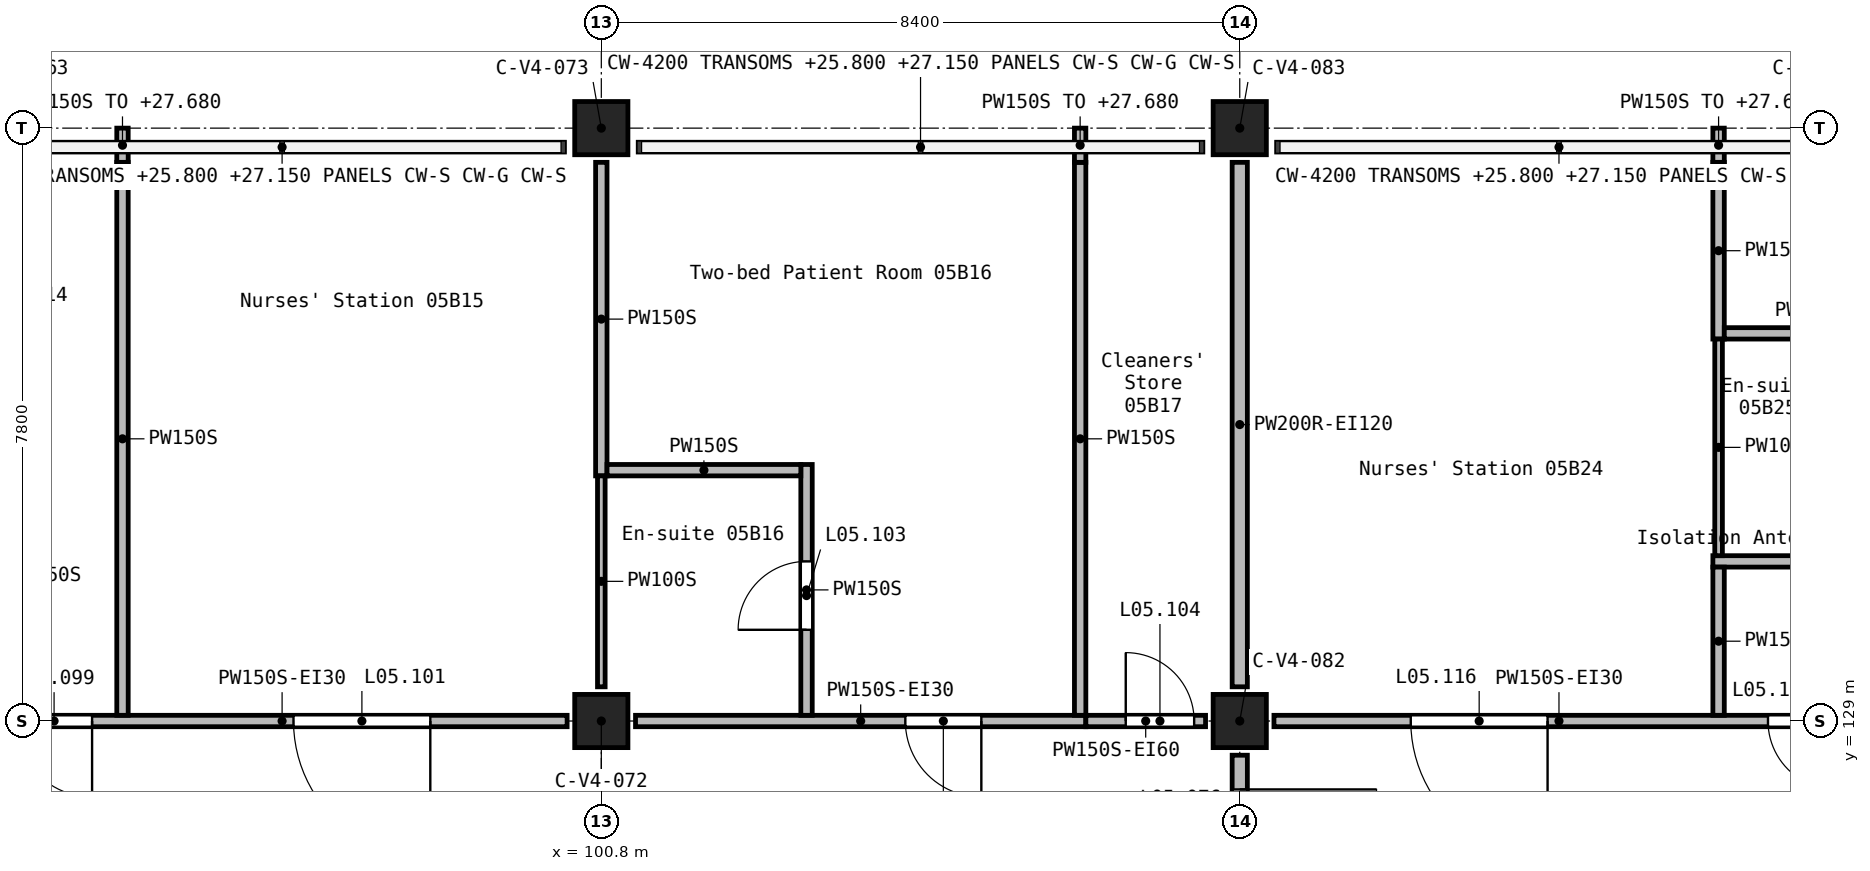
"""IFC4 building model, lengths in metres.
Left out: names, types, materials, properties, quantities, classifications, styles, units other than length and angle.
Written with IfcOpenShell. Run it as: python <this file> out.ifc"""

import sys

from ifc_helpers import new_model, si_unit, direction, frame, frame_2d, origin, origin_2d, place, context, subcontext, project, spatial, rectangle, extrude, element, fill, save


model = new_model("IFC4")
c1 = context("Model", 3, precision=1e-05, world=origin(), true_north=direction((0.0, 1.0)))
c2 = subcontext(c1, "Body", "Model", "MODEL_VIEW")
j1 = project(units=[si_unit("LENGTHUNIT", "METRE"), si_unit("PLANEANGLEUNIT", "RADIAN")], contexts=[c1])
p1 = place(None, origin())
s1 = spatial("IfcSite", under=j1, at=p1, CompositionType="ELEMENT")
p2 = place(p1, origin())
s2 = spatial("IfcBuilding", under=s1, at=p2, CompositionType="ELEMENT")
p3 = place(p2, frame((0.0, 0.0, 24.9)))
s3 = spatial("IfcBuildingStorey", under=s2, at=p3, CompositionType="ELEMENT", Elevation=24.9)
for number, where, z_axis, x_axis in (
    (1, (100.8, 129.0, 0.0), (0.0, 0.0, 1.0), (1.0, 0.0, 0.0)),
    (2, (100.8, 136.8, 0.0), (0.0, 0.0, 1.0), (1.0, 0.0, 0.0)),
    (3, (109.2, 129.0, 0.0), (0.0, 0.0, 1.0), (1.0, 0.0, 0.0)),
    (4, (109.2, 136.8, 0.0), (0.0, 0.0, 1.0), (1.0, 0.0, 0.0)),
):
    element("IfcColumn", number, at=place(p3, frame(where, z_axis=z_axis, x_axis=x_axis)), inside=s3, PredefinedType="COLUMN", context=c2, shape_type="SweptSolid", body=[
        extrude(rectangle(XDim=0.7, YDim=0.7, at=origin_2d()), origin(), (0.0, 0.0, 1.0), 3.9),
    ])
p4 = place(p3, frame((109.2, 136.35, 0.0), z_axis=(0.0, 0.0, 1.0), x_axis=(0.0, -1.0, 0.0)))
e5 = element("IfcWall", 5, at=p4, inside=s3, PredefinedType="SOLIDWALL", context=c2, shape_type="SweptSolid", body=[
    extrude(rectangle(XDim=6.9, YDim=0.2, at=frame_2d((3.45, 0.0))), origin(), (0.0, 0.0, 1.0), 3.6),
])
p5 = place(p3, frame((109.2, 128.55, 0.0), z_axis=(0.0, 0.0, 1.0), x_axis=(0.0, -1.0, 0.0)))
e6 = element("IfcWall", 6, at=p5, inside=s3, PredefinedType="SOLIDWALL", context=c2, shape_type="SweptSolid", body=[
    extrude(rectangle(XDim=2.7, YDim=0.2, at=frame_2d((1.35, 0.0))), origin(), (0.0, 0.0, 1.0), 3.6),
])
p6 = place(p5, frame((0.45, 0.0, 0.0)))
e7 = element("IfcOpeningElement", 7, at=p6, cuts=e6, PredefinedType="OPENING", context=c2, shape_type="SweptSolid", body=[
    extrude(rectangle(XDim=1.8, YDim=2.1, at=frame_2d((0.9, 1.05))), frame((0.0, 0.11, 0.0), z_axis=(0.0, -1.0, 0.0), x_axis=(1.0, 0.0, 0.0)), (0.0, 0.0, 1.0), 0.22),
])
p7 = place(p3, frame((107.175, 129.0, 0.0), z_axis=(0.0, 0.0, 1.0), x_axis=(-1.0, 0.0, 0.0)))
e8 = element("IfcWall", 8, at=p7, inside=s3, PredefinedType="PARTITIONING", context=c2, shape_type="SweptSolid", body=[
    extrude(rectangle(XDim=5.925, YDim=0.15, at=frame_2d((2.962, 0.0))), origin(), (0.0, 0.0, 1.0), 3.6),
])
p8 = place(p7, frame((1.375, 0.0, 0.0)))
e9 = element("IfcOpeningElement", 9, at=p8, cuts=e8, PredefinedType="OPENING", context=c2, shape_type="SweptSolid", body=[
    extrude(rectangle(XDim=1.0, YDim=2.1, at=frame_2d((0.5, 1.05))), frame((0.0, 0.085, 0.0), z_axis=(0.0, -1.0, 0.0), x_axis=(1.0, 0.0, 0.0)), (0.0, 0.0, 1.0), 0.17),
])
p9 = place(p3, frame((100.35, 129.0, 0.0), z_axis=(0.0, 0.0, 1.0), x_axis=(-1.0, 0.0, 0.0)))
e10 = element("IfcWall", 10, at=p9, inside=s3, PredefinedType="PARTITIONING", context=c2, shape_type="SweptSolid", body=[
    extrude(rectangle(XDim=7.5, YDim=0.15, at=frame_2d((3.75, 0.0))), origin(), (0.0, 0.0, 1.0), 3.6),
])
p10 = place(p9, frame((6.25, 0.0, 0.0)))
e11 = element("IfcOpeningElement", 11, at=p10, cuts=e10, PredefinedType="OPENING", context=c2, shape_type="SweptSolid", body=[
    extrude(rectangle(XDim=1.0, YDim=2.1, at=frame_2d((0.5, 1.05))), frame((0.0, 0.085, 0.0), z_axis=(0.0, -1.0, 0.0), x_axis=(1.0, 0.0, 0.0)), (0.0, 0.0, 1.0), 0.17),
])
p11 = place(p9, frame((1.8, 0.0, 0.0)))
e12 = element("IfcOpeningElement", 12, at=p11, cuts=e10, PredefinedType="OPENING", context=c2, shape_type="SweptSolid", body=[
    extrude(rectangle(XDim=1.8, YDim=2.1, at=frame_2d((0.9, 1.05))), frame((0.0, 0.085, 0.0), z_axis=(0.0, -1.0, 0.0), x_axis=(1.0, 0.0, 0.0)), (0.0, 0.0, 1.0), 0.17),
])
p12 = place(p3, frame((117.15, 129.0, 0.0), z_axis=(0.0, 0.0, 1.0), x_axis=(-1.0, 0.0, 0.0)))
e13 = element("IfcWall", 13, at=p12, inside=s3, PredefinedType="PARTITIONING", context=c2, shape_type="SweptSolid", body=[
    extrude(rectangle(XDim=7.5, YDim=0.15, at=frame_2d((3.75, 0.0))), origin(), (0.0, 0.0, 1.0), 3.6),
])
p13 = place(p12, frame((3.9, 0.0, 0.0)))
e14 = element("IfcOpeningElement", 14, at=p13, cuts=e13, PredefinedType="OPENING", context=c2, shape_type="SweptSolid", body=[
    extrude(rectangle(XDim=1.8, YDim=2.1, at=frame_2d((0.9, 1.05))), frame((0.0, 0.085, 0.0), z_axis=(0.0, -1.0, 0.0), x_axis=(1.0, 0.0, 0.0)), (0.0, 0.0, 1.0), 0.17),
])
p14 = place(p12, frame((0.1, 0.0, 0.0)))
e15 = element("IfcOpeningElement", 15, at=p14, cuts=e13, PredefinedType="OPENING", context=c2, shape_type="SweptSolid", body=[
    extrude(rectangle(XDim=0.9, YDim=2.1, at=frame_2d((0.45, 1.05))), frame((0.0, 0.085, 0.0), z_axis=(0.0, -1.0, 0.0), x_axis=(1.0, 0.0, 0.0)), (0.0, 0.0, 1.0), 0.17),
])
p15 = place(p3, frame((107.175, 129.0, 0.0), z_axis=(0.0, 0.0, 1.0), x_axis=(1.0, 0.0, 0.0)))
e16 = element("IfcWall", 16, at=p15, inside=s3, PredefinedType="PARTITIONING", context=c2, shape_type="SweptSolid", body=[
    extrude(rectangle(XDim=1.575, YDim=0.15, at=frame_2d((0.788, 0.0))), origin(), (0.0, 0.0, 1.0), 3.6),
])
p16 = place(p15, frame((0.525, 0.0, 0.0)))
e17 = element("IfcOpeningElement", 17, at=p16, cuts=e16, PredefinedType="OPENING", context=c2, shape_type="SweptSolid", body=[
    extrude(rectangle(XDim=0.9, YDim=2.1, at=frame_2d((0.45, 1.05))), frame((0.0, 0.085, 0.0), z_axis=(0.0, -1.0, 0.0), x_axis=(1.0, 0.0, 0.0)), (0.0, 0.0, 1.0), 0.17),
])
p17 = place(p3, frame((94.5, 129.075, 0.0), z_axis=(0.0, 0.0, 1.0), x_axis=(0.0, 1.0, 0.0)))
e18 = element("IfcWall", 18, at=p17, inside=s3, PredefinedType="PARTITIONING", context=c2, shape_type="SweptSolid", body=[
    extrude(rectangle(XDim=7.275, YDim=0.15, at=frame_2d((3.638, 0.0))), origin(), (0.0, 0.0, 1.0), 3.6),
])
p18 = place(p3, frame((94.5, 136.35, 0.0), z_axis=(0.0, 0.0, 1.0), x_axis=(0.0, 1.0, 0.0)))
e19 = element("IfcWall", 19, at=p18, inside=s3, PredefinedType="PARTITIONING", context=c2, shape_type="SweptSolid", body=[
    extrude(rectangle(XDim=0.45, YDim=0.15, at=frame_2d((0.225, 0.0))), origin(), (0.0, 0.0, 1.0), 2.78),
])
p19 = place(p3, frame((107.1, 129.075, 0.0), z_axis=(0.0, 0.0, 1.0), x_axis=(0.0, 1.0, 0.0)))
e20 = element("IfcWall", 20, at=p19, inside=s3, PredefinedType="PARTITIONING", context=c2, shape_type="SweptSolid", body=[
    extrude(rectangle(XDim=7.275, YDim=0.15, at=frame_2d((3.638, 0.0))), origin(), (0.0, 0.0, 1.0), 3.6),
])
p20 = place(p3, frame((107.1, 136.35, 0.0), z_axis=(0.0, 0.0, 1.0), x_axis=(0.0, 1.0, 0.0)))
e21 = element("IfcWall", 21, at=p20, inside=s3, PredefinedType="PARTITIONING", context=c2, shape_type="SweptSolid", body=[
    extrude(rectangle(XDim=0.45, YDim=0.15, at=frame_2d((0.225, 0.0))), origin(), (0.0, 0.0, 1.0), 2.78),
])
p21 = place(p3, frame((100.8, 132.225, 0.0), z_axis=(0.0, 0.0, 1.0), x_axis=(0.0, 1.0, 0.0)))
e22 = element("IfcWall", 22, at=p21, inside=s3, PredefinedType="PARTITIONING", context=c2, shape_type="SweptSolid", body=[
    extrude(rectangle(XDim=4.125, YDim=0.15, at=frame_2d((2.062, 0.0))), origin(), (0.0, 0.0, 1.0), 3.6),
])
p22 = place(p3, frame((115.425, 131.1, 0.0), z_axis=(0.0, 0.0, 1.0), x_axis=(1.0, 0.0, 0.0)))
e23 = element("IfcWall", 23, at=p22, inside=s3, PredefinedType="PARTITIONING", context=c2, shape_type="SweptSolid", body=[
    extrude(rectangle(XDim=4.2, YDim=0.15, at=frame_2d((2.1, 0.0))), origin(), (0.0, 0.0, 1.0), 3.6),
])
p23 = place(p22, frame((2.925, 0.0, 0.0)))
e24 = element("IfcOpeningElement", 24, at=p23, cuts=e23, PredefinedType="OPENING", context=c2, shape_type="SweptSolid", body=[
    extrude(rectangle(XDim=0.9, YDim=2.1, at=frame_2d((0.45, 1.05))), frame((0.0, 0.085, 0.0), z_axis=(0.0, -1.0, 0.0), x_axis=(1.0, 0.0, 0.0)), (0.0, 0.0, 1.0), 0.17),
])
p24 = place(p3, frame((103.5, 129.075, 0.0), z_axis=(0.0, 0.0, 1.0), x_axis=(0.0, 1.0, 0.0)))
e25 = element("IfcWall", 25, at=p24, inside=s3, PredefinedType="PARTITIONING", context=c2, shape_type="SweptSolid", body=[
    extrude(rectangle(XDim=3.3, YDim=0.15, at=frame_2d((1.65, 0.0))), origin(), (0.0, 0.0, 1.0), 3.6),
])
p25 = place(p24, frame((1.125, 0.0, 0.0)))
e26 = element("IfcOpeningElement", 26, at=p25, cuts=e25, PredefinedType="OPENING", context=c2, shape_type="SweptSolid", body=[
    extrude(rectangle(XDim=0.9, YDim=2.1, at=frame_2d((0.45, 1.05))), frame((0.0, 0.085, 0.0), z_axis=(0.0, -1.0, 0.0), x_axis=(1.0, 0.0, 0.0)), (0.0, 0.0, 1.0), 0.17),
])
p26 = place(p3, frame((115.5, 134.025, 0.0), z_axis=(0.0, 0.0, 1.0), x_axis=(0.0, 1.0, 0.0)))
e27 = element("IfcWall", 27, at=p26, inside=s3, PredefinedType="PARTITIONING", context=c2, shape_type="SweptSolid", body=[
    extrude(rectangle(XDim=2.325, YDim=0.15, at=frame_2d((1.163, 0.0))), origin(), (0.0, 0.0, 1.0), 3.6),
])
p27 = place(p3, frame((115.5, 136.35, 0.0), z_axis=(0.0, 0.0, 1.0), x_axis=(0.0, 1.0, 0.0)))
e28 = element("IfcWall", 28, at=p27, inside=s3, PredefinedType="PARTITIONING", context=c2, shape_type="SweptSolid", body=[
    extrude(rectangle(XDim=0.45, YDim=0.15, at=frame_2d((0.225, 0.0))), origin(), (0.0, 0.0, 1.0), 2.78),
])
p28 = place(p3, frame((100.875, 132.3, 0.0), z_axis=(0.0, 0.0, 1.0), x_axis=(1.0, 0.0, 0.0)))
e29 = element("IfcWall", 29, at=p28, inside=s3, PredefinedType="PARTITIONING", context=c2, shape_type="SweptSolid", body=[
    extrude(rectangle(XDim=2.55, YDim=0.15, at=frame_2d((1.275, 0.0))), origin(), (0.0, 0.0, 1.0), 3.6),
])
p29 = place(p3, frame((115.575, 134.1, 0.0), z_axis=(0.0, 0.0, 1.0), x_axis=(1.0, 0.0, 0.0)))
e30 = element("IfcWall", 30, at=p29, inside=s3, PredefinedType="PARTITIONING", context=c2, shape_type="SweptSolid", body=[
    extrude(rectangle(XDim=2.25, YDim=0.15, at=frame_2d((1.125, 0.0))), origin(), (0.0, 0.0, 1.0), 3.6),
])
p30 = place(p3, frame((115.5, 129.075, 0.0), z_axis=(0.0, 0.0, 1.0), x_axis=(0.0, 1.0, 0.0)))
e31 = element("IfcWall", 31, at=p30, inside=s3, PredefinedType="PARTITIONING", context=c2, shape_type="SweptSolid", body=[
    extrude(rectangle(XDim=1.95, YDim=0.15, at=frame_2d((0.975, 0.0))), origin(), (0.0, 0.0, 1.0), 3.6),
])
p31 = place(p3, frame((100.8, 129.45, 0.0), z_axis=(0.0, 0.0, 1.0), x_axis=(0.0, 1.0, 0.0)))
e32 = element("IfcWall", 32, at=p31, inside=s3, PredefinedType="PARTITIONING", context=c2, shape_type="SweptSolid", body=[
    extrude(rectangle(XDim=2.775, YDim=0.1, at=frame_2d((1.388, 0.0))), origin(), (0.0, 0.0, 1.0), 3.6),
])
p32 = place(p3, frame((115.5, 131.175, 0.0), z_axis=(0.0, 0.0, 1.0), x_axis=(0.0, 1.0, 0.0)))
e33 = element("IfcWall", 33, at=p32, inside=s3, PredefinedType="PARTITIONING", context=c2, shape_type="SweptSolid", body=[
    extrude(rectangle(XDim=2.85, YDim=0.1, at=frame_2d((1.425, 0.0))), origin(), (0.0, 0.0, 1.0), 3.6),
])
p33 = place(p6, origin())
e34 = element("IfcDoor", 34, at=p33, inside=s3, OperationType="DOUBLE_DOOR_SINGLE_SWING", PredefinedType="DOOR", context=c2, shape_type="SweptSolid", body=[
    extrude(rectangle(XDim=1.8, YDim=2.1, at=frame_2d((0.9, 1.05))), frame((0.0, 0.025, 0.0), z_axis=(0.0, -1.0, 0.0), x_axis=(1.0, 0.0, 0.0)), (0.0, 0.0, 1.0), 0.05),
])
fill(e7, e34)
p34 = place(p10, frame((1.0, 0.0, 0.0), z_axis=(0.0, 0.0, 1.0), x_axis=(-1.0, 0.0, 0.0)))
e35 = element("IfcDoor", 35, at=p34, inside=s3, OperationType="SINGLE_SWING_LEFT", PredefinedType="DOOR", context=c2, shape_type="SweptSolid", body=[
    extrude(rectangle(XDim=1.0, YDim=2.1, at=frame_2d((0.5, 1.05))), frame((0.0, 0.025, 0.0), z_axis=(0.0, -1.0, 0.0), x_axis=(1.0, 0.0, 0.0)), (0.0, 0.0, 1.0), 0.05),
])
fill(e11, e35)
p35 = place(p11, frame((1.8, 0.0, 0.0), z_axis=(0.0, 0.0, 1.0), x_axis=(-1.0, 0.0, 0.0)))
e36 = element("IfcDoor", 36, at=p35, inside=s3, OperationType="DOUBLE_DOOR_SINGLE_SWING", PredefinedType="DOOR", context=c2, shape_type="SweptSolid", body=[
    extrude(rectangle(XDim=1.8, YDim=2.1, at=frame_2d((0.9, 1.05))), frame((0.0, 0.025, 0.0), z_axis=(0.0, -1.0, 0.0), x_axis=(1.0, 0.0, 0.0)), (0.0, 0.0, 1.0), 0.05),
])
fill(e12, e36)
p36 = place(p8, frame((1.0, 0.0, 0.0), z_axis=(0.0, 0.0, 1.0), x_axis=(-1.0, 0.0, 0.0)))
e37 = element("IfcDoor", 37, at=p36, inside=s3, OperationType="SINGLE_SWING_RIGHT", PredefinedType="DOOR", context=c2, shape_type="SweptSolid", body=[
    extrude(rectangle(XDim=1.0, YDim=2.1, at=frame_2d((0.5, 1.05))), frame((0.0, 0.025, 0.0), z_axis=(0.0, -1.0, 0.0), x_axis=(1.0, 0.0, 0.0)), (0.0, 0.0, 1.0), 0.05),
])
fill(e9, e37)
p37 = place(p25, origin())
e38 = element("IfcDoor", 38, at=p37, inside=s3, OperationType="SINGLE_SWING_LEFT", PredefinedType="DOOR", context=c2, shape_type="SweptSolid", body=[
    extrude(rectangle(XDim=0.9, YDim=2.1, at=frame_2d((0.45, 1.05))), frame((0.0, 0.025, 0.0), z_axis=(0.0, -1.0, 0.0), x_axis=(1.0, 0.0, 0.0)), (0.0, 0.0, 1.0), 0.05),
])
fill(e26, e38)
p38 = place(p16, origin())
e39 = element("IfcDoor", 39, at=p38, inside=s3, OperationType="SINGLE_SWING_RIGHT", PredefinedType="DOOR", context=c2, shape_type="SweptSolid", body=[
    extrude(rectangle(XDim=0.9, YDim=2.1, at=frame_2d((0.45, 1.05))), frame((0.0, 0.025, 0.0), z_axis=(0.0, -1.0, 0.0), x_axis=(1.0, 0.0, 0.0)), (0.0, 0.0, 1.0), 0.05),
])
fill(e17, e39)
p39 = place(p13, frame((1.8, 0.0, 0.0), z_axis=(0.0, 0.0, 1.0), x_axis=(-1.0, 0.0, 0.0)))
e40 = element("IfcDoor", 40, at=p39, inside=s3, OperationType="DOUBLE_DOOR_SINGLE_SWING", PredefinedType="DOOR", context=c2, shape_type="SweptSolid", body=[
    extrude(rectangle(XDim=1.8, YDim=2.1, at=frame_2d((0.9, 1.05))), frame((0.0, 0.025, 0.0), z_axis=(0.0, -1.0, 0.0), x_axis=(1.0, 0.0, 0.0)), (0.0, 0.0, 1.0), 0.05),
])
fill(e14, e40)
p40 = place(p14, frame((0.9, 0.0, 0.0), z_axis=(0.0, 0.0, 1.0), x_axis=(-1.0, 0.0, 0.0)))
e41 = element("IfcDoor", 41, at=p40, inside=s3, OperationType="SINGLE_SWING_RIGHT", PredefinedType="DOOR", context=c2, shape_type="SweptSolid", body=[
    extrude(rectangle(XDim=0.9, YDim=2.1, at=frame_2d((0.45, 1.05))), frame((0.0, 0.025, 0.0), z_axis=(0.0, -1.0, 0.0), x_axis=(1.0, 0.0, 0.0)), (0.0, 0.0, 1.0), 0.05),
])
fill(e15, e41)
save(model, sys.argv[1])
